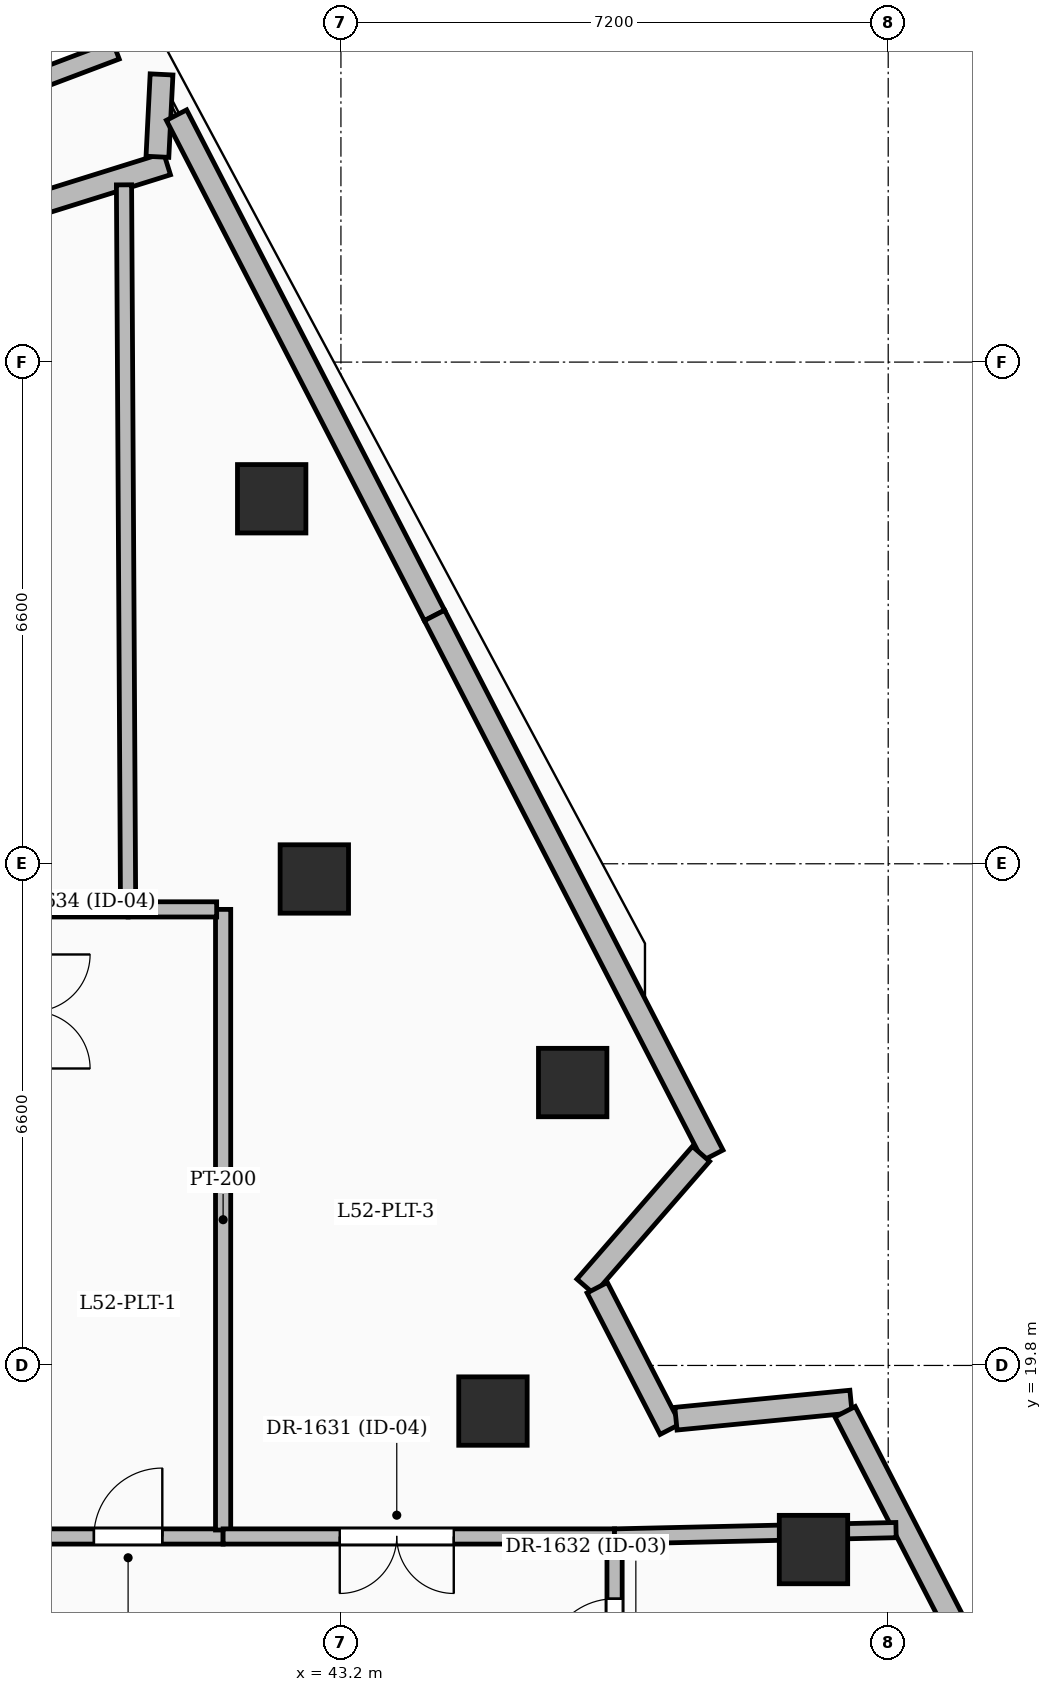
"""IFC4 building model, lengths in metres.
Left out: names, types, materials, properties, quantities, classifications, styles, units other than length and angle.
Written with IfcOpenShell. Run it as: python <this file> out.ifc"""

import sys

from ifc_helpers import new_model, si_unit, direction, frame, frame_2d, origin, origin_2d, place, context, subcontext, project, spatial, rectangle, extrude, element, fill, save


model = new_model("IFC4")
c1 = context("Model", 3, precision=1e-05, world=origin(), true_north=direction((0.0, 1.0)))
c2 = subcontext(c1, "Body", "Model", "MODEL_VIEW")
j1 = project(units=[si_unit("LENGTHUNIT", "METRE"), si_unit("PLANEANGLEUNIT", "RADIAN")], contexts=[c1])
p1 = place(None, origin())
s1 = spatial("IfcSite", under=j1, at=p1, CompositionType="ELEMENT")
p2 = place(p1, origin())
s2 = spatial("IfcBuilding", under=s1, at=p2, CompositionType="ELEMENT")
p3 = place(p2, frame((0.0, 0.0, 201.6)))
s3 = spatial("IfcBuildingStorey", under=s2, at=p3, CompositionType="ELEMENT", Elevation=201.6)
for number, where, z_axis, x_axis in (
    (1, (45.2, 19.2, 0.0), (0.0, 0.0, 1.0), (1.0, 0.0, 0.0)),
    (2, (42.85, 26.2, 0.0), (0.0, 0.0, 1.0), (1.0, 0.0, 0.0)),
    (3, (49.417, 17.378, 0.0), (0.0, 0.0, 1.0), (1.0, 0.0, 0.0)),
    (4, (46.249, 23.522, 0.0), (0.0, 0.0, 1.0), (1.0, 0.0, 0.0)),
    (5, (42.289, 31.202, 0.0), (0.0, 0.0, 1.0), (1.0, 0.0, 0.0)),
):
    element("IfcColumn", number, at=place(p3, frame(where, z_axis=z_axis, x_axis=x_axis)), inside=s3, PredefinedType="COLUMN", context=c2, shape_type="SweptSolid", body=[
        extrude(rectangle(XDim=0.9, YDim=0.9, at=origin_2d()), origin(), (0.0, 0.0, 1.0), 5.4),
    ])
p4 = place(p3, frame((38.886, 34.975, 0.0), z_axis=(0.0, 0.0, 1.0), x_axis=(0.954524975295, 0.298130963736, 0.0)))
e6 = element("IfcWall", 6, at=p4, inside=s3, PredefinedType="SOLIDWALL", context=c2, shape_type="SweptSolid", body=[
    extrude(rectangle(XDim=2.124, YDim=0.3, at=frame_2d((1.062, 0.0))), origin(), (0.0, 0.0, 1.0), 5.15),
])
p5 = place(p3, frame((40.786, 35.701, 0.0), z_axis=(0.0, 0.0, 1.0), x_axis=(0.05016199642, 0.998741094636, 0.0)))
e7 = element("IfcWall", 7, at=p5, inside=s3, PredefinedType="SOLIDWALL", context=c2, shape_type="SweptSolid", body=[
    extrude(rectangle(XDim=1.085, YDim=0.3, at=frame_2d((0.543, 0.0))), origin(), (0.0, 0.0, 1.0), 5.15),
])
p6 = place(p3, frame((41.037, 36.25, 0.0), z_axis=(0.0, 0.0, 1.0), x_axis=(0.458281808999, -0.888806943909, 0.0)))
e8 = element("IfcWall", 8, at=p6, inside=s3, PredefinedType="SOLIDWALL", context=c2, shape_type="SweptSolid", body=[
    extrude(rectangle(XDim=7.406, YDim=0.3, at=frame_2d((3.703, 0.0))), origin(), (0.0, 0.0, 1.0), 5.15),
])
p7 = place(p3, frame((44.431, 29.667, 0.0), z_axis=(0.0, 0.0, 1.0), x_axis=(0.45831213698, -0.888791305705, 0.0)))
e9 = element("IfcWall", 9, at=p7, inside=s3, PredefinedType="SOLIDWALL", context=c2, shape_type="SweptSolid", body=[
    extrude(rectangle(XDim=7.991, YDim=0.3, at=frame_2d((3.996, 0.0))), origin(), (0.0, 0.0, 1.0), 5.15),
])
p8 = place(p3, frame((47.937, 22.583, 0.0), z_axis=(0.0, 0.0, 1.0), x_axis=(-0.656291017246, -0.754507853294, 0.0)))
e10 = element("IfcWall", 10, at=p8, inside=s3, PredefinedType="SOLIDWALL", context=c2, shape_type="SweptSolid", body=[
    extrude(rectangle(XDim=2.314, YDim=0.3, at=frame_2d((1.157, 0.0))), origin(), (0.0, 0.0, 1.0), 4.475),
])
p9 = place(p3, frame((46.572, 20.823, 0.0), z_axis=(0.0, 0.0, 1.0), x_axis=(0.458461784515, -0.888714122842, 0.0)))
e11 = element("IfcWall", 11, at=p9, inside=s3, PredefinedType="SOLIDWALL", context=c2, shape_type="SweptSolid", body=[
    extrude(rectangle(XDim=2.094, YDim=0.3, at=frame_2d((1.047, 0.0))), origin(), (0.0, 0.0, 1.0), 5.15),
])
p10 = place(p3, frame((47.607, 19.1, 0.0), z_axis=(0.0, 0.0, 1.0), x_axis=(0.995257209417, 0.097278399988, 0.0)))
e12 = element("IfcWall", 12, at=p10, inside=s3, PredefinedType="SOLIDWALL", context=c2, shape_type="SweptSolid", body=[
    extrude(rectangle(XDim=2.314, YDim=0.3, at=frame_2d((1.157, 0.0))), origin(), (0.0, 0.0, 1.0), 4.475),
])
p11 = place(p3, frame((49.833, 19.191, 0.0), z_axis=(0.0, 0.0, 1.0), x_axis=(0.458291476536, -0.88880195912, 0.0)))
e13 = element("IfcWall", 13, at=p11, inside=s3, PredefinedType="SOLIDWALL", context=c2, shape_type="SweptSolid", body=[
    extrude(rectangle(XDim=7.716, YDim=0.3, at=frame_2d((3.858, 0.0))), origin(), (0.0, 0.0, 1.0), 5.15),
])
p12 = place(p3, frame((38.176, 36.325, 0.0), z_axis=(0.0, 0.0, 1.0), x_axis=(0.93551682073, 0.353282150882, 0.0)))
e14 = element("IfcWall", 14, at=p12, inside=s3, PredefinedType="PARAPET", context=c2, shape_type="SweptSolid", body=[
    extrude(rectangle(XDim=2.205, YDim=0.25, at=frame_2d((1.103, 0.0))), origin(), (0.0, 0.0, 1.0), 1.15),
])
p13 = place(p3, frame((39.235, 17.55, 0.0), z_axis=(0.0, 0.0, 1.0), x_axis=(1.0, 0.0, 0.0)))
e15 = element("IfcWall", 15, at=p13, inside=s3, PredefinedType="PARTITIONING", context=c2, shape_type="SweptSolid", body=[
    extrude(rectangle(XDim=2.415, YDim=0.2, at=frame_2d((1.208, 0.0))), origin(), (0.0, 0.0, 1.0), 5.15),
])
p14 = place(p13, frame((0.715, 0.0, 0.0)))
e16 = element("IfcOpeningElement", 16, at=p14, cuts=e15, PredefinedType="OPENING", context=c2, shape_type="SweptSolid", body=[
    extrude(rectangle(XDim=0.9, YDim=2.1, at=frame_2d((0.45, 1.05))), frame((0.0, 0.11, 0.0), z_axis=(0.0, -1.0, 0.0), x_axis=(1.0, 0.0, 0.0)), (0.0, 0.0, 1.0), 0.22),
])
p15 = place(p3, frame((41.65, 17.635, 0.0), z_axis=(0.0, 0.0, 1.0), x_axis=(0.0, 1.0, 0.0)))
e17 = element("IfcWall", 17, at=p15, inside=s3, PredefinedType="PARTITIONING", context=c2, shape_type="SweptSolid", body=[
    extrude(rectangle(XDim=8.165, YDim=0.2, at=frame_2d((4.083, 0.0))), origin(), (0.0, 0.0, 1.0), 5.15),
])
p16 = place(p3, frame((41.565, 25.8, 0.0), z_axis=(0.0, 0.0, 1.0), x_axis=(-1.0, 0.0, 0.0)))
e18 = element("IfcWall", 18, at=p16, inside=s3, PredefinedType="PARTITIONING", context=c2, shape_type="SweptSolid", body=[
    extrude(rectangle(XDim=1.165, YDim=0.2, at=frame_2d((0.583, 0.0))), origin(), (0.0, 0.0, 1.0), 5.15),
])
p17 = place(p3, frame((40.4, 25.8, 0.0), z_axis=(0.0, 0.0, 1.0), x_axis=(-1.0, 0.0, 0.0)))
e19 = element("IfcWall", 19, at=p17, inside=s3, PredefinedType="PARTITIONING", context=c2, shape_type="SweptSolid", body=[
    extrude(rectangle(XDim=1.25, YDim=0.2, at=frame_2d((0.625, 0.0))), origin(), (0.0, 0.0, 1.0), 5.15),
])
p18 = place(p3, frame((46.8, 17.55, 0.0), z_axis=(0.0, 0.0, 1.0), x_axis=(-1.0, 0.0, 0.0)))
e20 = element("IfcWall", 20, at=p18, inside=s3, PredefinedType="PARTITIONING", context=c2, shape_type="SweptSolid", body=[
    extrude(rectangle(XDim=5.15, YDim=0.2, at=frame_2d((2.575, 0.0))), origin(), (0.0, 0.0, 1.0), 4.335),
])
p19 = place(p18, frame((2.115, 0.0, 0.0)))
e21 = element("IfcOpeningElement", 21, at=p19, cuts=e20, PredefinedType="OPENING", context=c2, shape_type="SweptSolid", body=[
    extrude(rectangle(XDim=1.5, YDim=2.2, at=frame_2d((0.75, 1.1))), frame((0.0, 0.11, 0.0), z_axis=(0.0, -1.0, 0.0), x_axis=(1.0, 0.0, 0.0)), (0.0, 0.0, 1.0), 0.22),
])
p20 = place(p3, frame((46.8, 15.125, 0.0), z_axis=(0.0, 0.0, 1.0), x_axis=(0.0, 1.0, 0.0)))
e22 = element("IfcWall", 22, at=p20, inside=s3, PredefinedType="PARTITIONING", context=c2, shape_type="SweptSolid", body=[
    extrude(rectangle(XDim=2.34, YDim=0.2, at=frame_2d((1.17, 0.0))), origin(), (0.0, 0.0, 1.0), 4.335),
])
p21 = place(p20, frame((0.706, 0.0, 0.0)))
e23 = element("IfcOpeningElement", 23, at=p21, cuts=e22, PredefinedType="OPENING", context=c2, shape_type="SweptSolid", body=[
    extrude(rectangle(XDim=0.9, YDim=2.1, at=frame_2d((0.45, 1.05))), frame((0.0, 0.11, 0.0), z_axis=(0.0, -1.0, 0.0), x_axis=(1.0, 0.0, 0.0)), (0.0, 0.0, 1.0), 0.22),
])
p22 = place(p3, frame((40.346, 35.332, 0.0), z_axis=(0.0, 0.0, 1.0), x_axis=(0.005685397192, -0.999983837999, 0.0)))
e24 = element("IfcWall", 24, at=p22, inside=s3, PredefinedType="PARTITIONING", context=c2, shape_type="SweptSolid", body=[
    extrude(rectangle(XDim=9.447, YDim=0.2, at=frame_2d((4.724, 0.0))), origin(), (0.0, 0.0, 1.0), 4.335),
])
p23 = place(p3, frame((46.8, 17.55, 0.0), z_axis=(0.0, 0.0, 1.0), x_axis=(0.99974288939, 0.022674988722, 0.0)))
e25 = element("IfcWall", 25, at=p23, inside=s3, PredefinedType="PARTITIONING", context=c2, shape_type="SweptSolid", body=[
    extrude(rectangle(XDim=3.704, YDim=0.2, at=frame_2d((1.852, 0.0))), origin(), (0.0, 0.0, 1.0), 5.15),
])
p24 = place(p14, origin())
e26 = element("IfcDoor", 26, at=p24, inside=s3, OperationType="SINGLE_SWING_RIGHT", PredefinedType="DOOR", context=c2, shape_type="SweptSolid", body=[
    extrude(rectangle(XDim=0.9, YDim=2.1, at=frame_2d((0.45, 1.05))), frame((0.0, 0.025, 0.0), z_axis=(0.0, -1.0, 0.0), x_axis=(1.0, 0.0, 0.0)), (0.0, 0.0, 1.0), 0.05),
])
fill(e16, e26)
p25 = place(p19, origin())
e27 = element("IfcDoor", 27, at=p25, inside=s3, OperationType="DOUBLE_DOOR_SINGLE_SWING", PredefinedType="DOOR", context=c2, shape_type="SweptSolid", body=[
    extrude(rectangle(XDim=1.5, YDim=2.2, at=frame_2d((0.75, 1.1))), frame((0.0, 0.025, 0.0), z_axis=(0.0, -1.0, 0.0), x_axis=(1.0, 0.0, 0.0)), (0.0, 0.0, 1.0), 0.05),
])
fill(e21, e27)
p26 = place(p21, origin())
e28 = element("IfcDoor", 28, at=p26, inside=s3, OperationType="SINGLE_SWING_LEFT", PredefinedType="DOOR", context=c2, shape_type="SweptSolid", body=[
    extrude(rectangle(XDim=0.9, YDim=2.1, at=frame_2d((0.45, 1.05))), frame((0.0, 0.025, 0.0), z_axis=(0.0, -1.0, 0.0), x_axis=(1.0, 0.0, 0.0)), (0.0, 0.0, 1.0), 0.05),
])
fill(e23, e28)
save(model, sys.argv[1])
